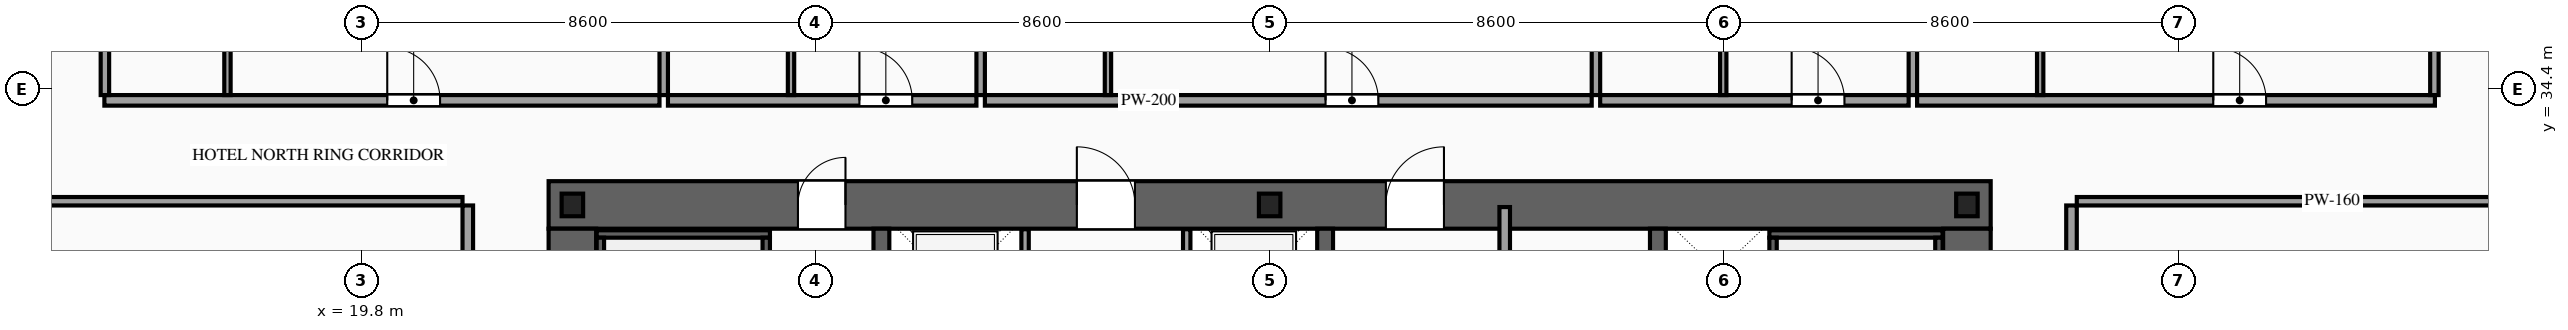
"""IFC4 building model, lengths in metres.
Left out: names, types, materials, properties, quantities, classifications, styles, units other than length and angle.
Written with IfcOpenShell. Run it as: python <this file> out.ifc"""

import sys

from ifc_helpers import new_model, si_unit, direction, frame, frame_2d, origin, origin_2d, place, context, subcontext, project, spatial, rectangle, i_section, extrude, source, transform, mapped, element, fill, save


model = new_model("IFC4")
c1 = context("Model", 3, precision=1e-05, world=origin(), true_north=direction((0.0, 1.0)))
c2 = subcontext(c1, "Body", "Model", "MODEL_VIEW")
j1 = project(units=[si_unit("LENGTHUNIT", "METRE"), si_unit("PLANEANGLEUNIT", "RADIAN")], contexts=[c1])
p1 = place(None, origin())
s1 = spatial("IfcSite", under=j1, at=p1, CompositionType="ELEMENT")
p2 = place(p1, origin())
s2 = spatial("IfcBuilding", under=s1, at=p2, CompositionType="ELEMENT")
p3 = place(p2, frame((0.0, 0.0, 82.0)))
s3 = spatial("IfcBuildingStorey", under=s2, at=p3, CompositionType="ELEMENT", Elevation=82.0)
p4 = place(p3, frame((23.35, 32.2, 0.0), z_axis=(0.0, 0.0, 1.0), x_axis=(1.0, 0.0, 0.0)))
e1 = element("IfcWall", 1, at=p4, inside=s3, PredefinedType="SHEAR", context=c2, shape_type="SweptSolid", body=[
    extrude(rectangle(XDim=27.3, YDim=0.9, at=frame_2d((13.65, 0.0))), origin(), (0.0, 0.0, 1.0), 3.6),
])
p5 = place(p4, frame((4.72, 0.0, 0.0)))
e2 = element("IfcOpeningElement", 2, at=p5, cuts=e1, PredefinedType="OPENING", context=c2, shape_type="SweptSolid", body=[
    extrude(rectangle(XDim=0.9, YDim=2.15, at=frame_2d((0.45, 1.075))), frame((0.0, 0.465, 0.0), z_axis=(0.0, -1.0, 0.0), x_axis=(1.0, 0.0, 0.0)), (0.0, 0.0, 1.0), 0.93),
])
p6 = place(p4, frame((10.0, 0.0, 0.0)))
e3 = element("IfcOpeningElement", 3, at=p6, cuts=e1, PredefinedType="OPENING", context=c2, shape_type="SweptSolid", body=[
    extrude(rectangle(XDim=1.1, YDim=2.2, at=frame_2d((0.55, 1.1))), frame((0.0, 0.465, 0.0), z_axis=(0.0, -1.0, 0.0), x_axis=(1.0, 0.0, 0.0)), (0.0, 0.0, 1.0), 0.93),
])
p7 = place(p4, frame((15.85, 0.0, 0.0)))
e4 = element("IfcOpeningElement", 4, at=p7, cuts=e1, PredefinedType="OPENING", context=c2, shape_type="SweptSolid", body=[
    extrude(rectangle(XDim=1.1, YDim=2.2, at=frame_2d((0.55, 1.1))), frame((0.0, 0.465, 0.0), z_axis=(0.0, -1.0, 0.0), x_axis=(1.0, 0.0, 0.0)), (0.0, 0.0, 1.0), 0.93),
])
m1 = source(origin(), c2, "Body", "SweptSolid", [
    extrude(rectangle(XDim=11.9, YDim=0.9, at=frame_2d((5.95, 0.0))), origin(), (0.0, 0.0, 1.0), 3.6),
])
for number, where, z_axis, x_axis in (
    (5, (23.8, 19.85, 0.0), (0.0, 0.0, 1.0), (0.0, 1.0, 0.0)),
    (6, (50.2, 19.85, 0.0), (0.0, 0.0, 1.0), (0.0, 1.0, 0.0)),
):
    element("IfcWall", number, at=place(p3, frame(where, z_axis=z_axis, x_axis=x_axis)), inside=s3, PredefinedType="SHEAR", context=c2, shape_type="MappedRepresentation", body=[
        mapped(m1, transform((0.0, 0.0, 0.0), scale=1.0)),
    ])
m2 = source(origin(), c2, "Body", "SweptSolid", [
    extrude(rectangle(XDim=11.9, YDim=0.3, at=frame_2d((5.95, 0.0))), origin(), (0.0, 0.0, 1.0), 3.6),
])
for number, where, z_axis, x_axis in (
    (7, (29.65, 19.85, 0.0), (0.0, 0.0, 1.0), (0.0, 1.0, 0.0)),
    (8, (38.05, 19.85, 0.0), (0.0, 0.0, 1.0), (0.0, 1.0, 0.0)),
    (9, (44.35, 19.85, 0.0), (0.0, 0.0, 1.0), (0.0, 1.0, 0.0)),
):
    element("IfcWall", number, at=place(p3, frame(where, z_axis=z_axis, x_axis=x_axis)), inside=s3, PredefinedType="SOLIDWALL", context=c2, shape_type="MappedRepresentation", body=[
        mapped(m2, transform((0.0, 0.0, 0.0), scale=1.0)),
    ])
m3 = source(origin(), c2, "Body", "SweptSolid", [
    extrude(i_section(OverallWidth=0.407, OverallDepth=0.428, WebThickness=0.02, FlangeThickness=0.035, at=origin_2d()), origin(), (0.0, 0.0, 1.0), 3.6),
])
for number, where, z_axis, x_axis in (
    (10, (23.8, 32.2, 0.0), (0.0, 0.0, 1.0), (1.0, 0.0, 0.0)),
    (11, (37.0, 32.2, 0.0), (0.0, 0.0, 1.0), (1.0, 0.0, 0.0)),
    (12, (50.2, 32.2, 0.0), (0.0, 0.0, 1.0), (1.0, 0.0, 0.0)),
):
    element("IfcColumn", number, at=place(p3, frame(where, z_axis=z_axis, x_axis=x_axis)), inside=s3, PredefinedType="COLUMN", context=c2, shape_type="MappedRepresentation", body=[
        mapped(m3, transform((0.0, 0.0, 0.0), scale=1.0)),
    ])
p8 = place(p3, frame((32.37, 29.4, 0.0), z_axis=(0.0, 0.0, 1.0), x_axis=(0.0, 1.0, 0.0)))
e13 = element("IfcWall", 13, at=p8, inside=s3, PredefinedType="SOLIDWALL", context=c2, shape_type="SweptSolid", body=[
    extrude(rectangle(XDim=2.34, YDim=0.14, at=frame_2d((1.17, 0.0))), origin(), (0.0, 0.0, 1.0), 3.32),
])
p9 = place(p8, frame((0.62, 0.0, 0.0)))
e14 = element("IfcOpeningElement", 14, at=p9, cuts=e13, PredefinedType="OPENING", context=c2, shape_type="SweptSolid", body=[
    extrude(rectangle(XDim=1.1, YDim=2.2, at=frame_2d((0.55, 1.1))), frame((0.0, 0.085, 0.0), z_axis=(0.0, -1.0, 0.0), x_axis=(1.0, 0.0, 0.0)), (0.0, 0.0, 1.0), 0.17),
])
p10 = place(p3, frame((35.43, 29.4, 0.0), z_axis=(0.0, 0.0, 1.0), x_axis=(0.0, 1.0, 0.0)))
e15 = element("IfcWall", 15, at=p10, inside=s3, PredefinedType="SOLIDWALL", context=c2, shape_type="SweptSolid", body=[
    extrude(rectangle(XDim=2.34, YDim=0.14, at=frame_2d((1.17, 0.0))), origin(), (0.0, 0.0, 1.0), 3.32),
])
p11 = place(p10, frame((0.62, 0.0, 0.0)))
e16 = element("IfcOpeningElement", 16, at=p11, cuts=e15, PredefinedType="OPENING", context=c2, shape_type="SweptSolid", body=[
    extrude(rectangle(XDim=1.1, YDim=2.2, at=frame_2d((0.55, 1.1))), frame((0.0, 0.085, 0.0), z_axis=(0.0, -1.0, 0.0), x_axis=(1.0, 0.0, 0.0)), (0.0, 0.0, 1.0), 0.17),
])
m4 = source(origin(), c2, "Body", "SweptSolid", [
    extrude(rectangle(XDim=3.28, YDim=0.14, at=frame_2d((1.64, 0.0))), origin(), (0.0, 0.0, 1.0), 3.32),
])
p12 = place(p3, frame((24.26, 31.65, 0.0), z_axis=(0.0, 0.0, 1.0), x_axis=(1.0, 0.0, 0.0)))
e17 = element("IfcWall", 17, at=p12, inside=s3, PredefinedType="SOLIDWALL", context=c2, shape_type="MappedRepresentation", body=[
    mapped(m4, transform((0.0, 0.0, 0.0), scale=1.0)),
])
m5 = source(origin(), c2, "Body", "SweptSolid", [
    extrude(rectangle(XDim=8.94, YDim=0.14, at=frame_2d((4.47, 0.0))), origin(), (0.0, 0.0, 1.0), 3.32),
])
for number, where, z_axis, x_axis in (
    (18, (24.33, 22.64, 0.0), (0.0, 0.0, 1.0), (0.0, 1.0, 0.0)),
    (19, (27.47, 22.64, 0.0), (0.0, 0.0, 1.0), (0.0, 1.0, 0.0)),
):
    element("IfcWall", number, at=place(p3, frame(where, z_axis=z_axis, x_axis=x_axis)), inside=s3, PredefinedType="SOLIDWALL", context=c2, shape_type="MappedRepresentation", body=[
        mapped(m5, transform((0.0, 0.0, 0.0), scale=1.0)),
    ])
p13 = place(p3, frame((46.46, 31.65, 0.0), z_axis=(0.0, 0.0, 1.0), x_axis=(1.0, 0.0, 0.0)))
e20 = element("IfcWall", 20, at=p13, inside=s3, PredefinedType="SOLIDWALL", context=c2, shape_type="MappedRepresentation", body=[
    mapped(m4, transform((0.0, 0.0, 0.0), scale=1.0)),
])
for number, where, z_axis, x_axis in (
    (21, (46.53, 22.64, 0.0), (0.0, 0.0, 1.0), (0.0, 1.0, 0.0)),
    (22, (49.67, 22.64, 0.0), (0.0, 0.0, 1.0), (0.0, 1.0, 0.0)),
):
    element("IfcWall", number, at=place(p3, frame(where, z_axis=z_axis, x_axis=x_axis)), inside=s3, PredefinedType="SOLIDWALL", context=c2, shape_type="MappedRepresentation", body=[
        mapped(m5, transform((0.0, 0.0, 0.0), scale=1.0)),
    ])
m6 = source(origin(), c2, "Body", "SweptSolid", [
    extrude(rectangle(XDim=12.72, YDim=0.2, at=frame_2d((6.36, 0.0))), origin(), (0.0, 0.0, 1.0), 3.32),
])
p14 = place(p3, frame((41.45, 19.44, 0.0), z_axis=(0.0, 0.0, 1.0), x_axis=(0.0, 1.0, 0.0)))
e23 = element("IfcWall", 23, at=p14, inside=s3, PredefinedType="PARTITIONING", context=c2, shape_type="MappedRepresentation", body=[
    mapped(m6, transform((0.0, 0.0, 0.0), scale=1.0)),
])
p15 = place(p3, frame((14.94, 34.18, 0.0), z_axis=(0.0, 0.0, 1.0), x_axis=(1.0, 0.0, 0.0)))
e24 = element("IfcWall", 24, at=p15, inside=s3, PredefinedType="PARTITIONING", context=c2, shape_type="SweptSolid", body=[
    extrude(rectangle(XDim=10.509, YDim=0.2, at=frame_2d((5.254, 0.0))), origin(), (0.0, 0.0, 1.0), 3.32),
])
p16 = place(p15, frame((5.355, 0.0, 0.0)))
e25 = element("IfcOpeningElement", 25, at=p16, cuts=e24, PredefinedType="OPENING", context=c2, shape_type="SweptSolid", body=[
    extrude(rectangle(XDim=1.0, YDim=2.2, at=frame_2d((0.5, 1.1))), frame((0.0, 0.115, 0.0), z_axis=(0.0, -1.0, 0.0), x_axis=(1.0, 0.0, 0.0)), (0.0, 0.0, 1.0), 0.23),
])
m7 = source(origin(), c2, "Body", "SweptSolid", [
    extrude(rectangle(XDim=16.47, YDim=0.16, at=frame_2d((8.235, 0.0))), origin(), (0.0, 0.0, 1.0), 3.32),
])
p17 = place(p3, frame((25.529, 34.28, 0.0), z_axis=(0.0, 0.0, 1.0), x_axis=(0.0, 1.0, 0.0)))
e26 = element("IfcWall", 26, at=p17, inside=s3, PredefinedType="PARTITIONING", context=c2, shape_type="MappedRepresentation", body=[
    mapped(m7, transform((0.0, 0.0, 0.0), scale=1.0)),
])
m8 = source(origin(), c2, "Body", "SweptSolid", [
    extrude(rectangle(XDim=2.42, YDim=0.12, at=frame_2d((1.21, 0.0))), origin(), (0.0, 0.0, 1.0), 3.32),
])
p18 = place(p3, frame((17.27, 34.28, 0.0), z_axis=(0.0, 0.0, 1.0), x_axis=(0.0, 1.0, 0.0)))
e27 = element("IfcWall", 27, at=p18, inside=s3, PredefinedType="PARTITIONING", context=c2, shape_type="MappedRepresentation", body=[
    mapped(m8, transform((0.0, 0.0, 0.0), scale=1.0)),
])
p19 = place(p3, frame((25.609, 34.18, 0.0), z_axis=(0.0, 0.0, 1.0), x_axis=(1.0, 0.0, 0.0)))
e28 = element("IfcWall", 28, at=p19, inside=s3, PredefinedType="PARTITIONING", context=c2, shape_type="SweptSolid", body=[
    extrude(rectangle(XDim=5.84, YDim=0.2, at=frame_2d((2.92, 0.0))), origin(), (0.0, 0.0, 1.0), 3.32),
])
p20 = place(p19, frame((3.625, 0.0, 0.0)))
e29 = element("IfcOpeningElement", 29, at=p20, cuts=e28, PredefinedType="OPENING", context=c2, shape_type="SweptSolid", body=[
    extrude(rectangle(XDim=1.0, YDim=2.2, at=frame_2d((0.5, 1.1))), frame((0.0, 0.115, 0.0), z_axis=(0.0, -1.0, 0.0), x_axis=(1.0, 0.0, 0.0)), (0.0, 0.0, 1.0), 0.23),
])
p21 = place(p3, frame((31.529, 34.28, 0.0), z_axis=(0.0, 0.0, 1.0), x_axis=(0.0, 1.0, 0.0)))
e30 = element("IfcWall", 30, at=p21, inside=s3, PredefinedType="PARTITIONING", context=c2, shape_type="MappedRepresentation", body=[
    mapped(m7, transform((0.0, 0.0, 0.0), scale=1.0)),
])
p22 = place(p3, frame((27.939, 34.28, 0.0), z_axis=(0.0, 0.0, 1.0), x_axis=(0.0, 1.0, 0.0)))
e31 = element("IfcWall", 31, at=p22, inside=s3, PredefinedType="PARTITIONING", context=c2, shape_type="MappedRepresentation", body=[
    mapped(m8, transform((0.0, 0.0, 0.0), scale=1.0)),
])
p23 = place(p3, frame((31.609, 34.18, 0.0), z_axis=(0.0, 0.0, 1.0), x_axis=(1.0, 0.0, 0.0)))
e32 = element("IfcWall", 32, at=p23, inside=s3, PredefinedType="PARTITIONING", context=c2, shape_type="SweptSolid", body=[
    extrude(rectangle(XDim=11.488, YDim=0.2, at=frame_2d((5.744, 0.0))), origin(), (0.0, 0.0, 1.0), 3.32),
])
p24 = place(p23, frame((6.449, 0.0, 0.0)))
e33 = element("IfcOpeningElement", 33, at=p24, cuts=e32, PredefinedType="OPENING", context=c2, shape_type="SweptSolid", body=[
    extrude(rectangle(XDim=1.0, YDim=2.2, at=frame_2d((0.5, 1.1))), frame((0.0, 0.115, 0.0), z_axis=(0.0, -1.0, 0.0), x_axis=(1.0, 0.0, 0.0)), (0.0, 0.0, 1.0), 0.23),
])
p25 = place(p3, frame((43.177, 34.28, 0.0), z_axis=(0.0, 0.0, 1.0), x_axis=(0.0, 1.0, 0.0)))
e34 = element("IfcWall", 34, at=p25, inside=s3, PredefinedType="PARTITIONING", context=c2, shape_type="MappedRepresentation", body=[
    mapped(m7, transform((0.0, 0.0, 0.0), scale=1.0)),
])
p26 = place(p3, frame((33.939, 34.28, 0.0), z_axis=(0.0, 0.0, 1.0), x_axis=(0.0, 1.0, 0.0)))
e35 = element("IfcWall", 35, at=p26, inside=s3, PredefinedType="PARTITIONING", context=c2, shape_type="MappedRepresentation", body=[
    mapped(m8, transform((0.0, 0.0, 0.0), scale=1.0)),
])
p27 = place(p3, frame((43.257, 34.18, 0.0), z_axis=(0.0, 0.0, 1.0), x_axis=(1.0, 0.0, 0.0)))
e36 = element("IfcWall", 36, at=p27, inside=s3, PredefinedType="PARTITIONING", context=c2, shape_type="SweptSolid", body=[
    extrude(rectangle(XDim=5.84, YDim=0.2, at=frame_2d((2.92, 0.0))), origin(), (0.0, 0.0, 1.0), 3.32),
])
p28 = place(p27, frame((3.625, 0.0, 0.0)))
e37 = element("IfcOpeningElement", 37, at=p28, cuts=e36, PredefinedType="OPENING", context=c2, shape_type="SweptSolid", body=[
    extrude(rectangle(XDim=1.0, YDim=2.2, at=frame_2d((0.5, 1.1))), frame((0.0, 0.115, 0.0), z_axis=(0.0, -1.0, 0.0), x_axis=(1.0, 0.0, 0.0)), (0.0, 0.0, 1.0), 0.23),
])
p29 = place(p3, frame((49.177, 34.28, 0.0), z_axis=(0.0, 0.0, 1.0), x_axis=(0.0, 1.0, 0.0)))
e38 = element("IfcWall", 38, at=p29, inside=s3, PredefinedType="PARTITIONING", context=c2, shape_type="MappedRepresentation", body=[
    mapped(m7, transform((0.0, 0.0, 0.0), scale=1.0)),
])
p30 = place(p3, frame((45.587, 34.28, 0.0), z_axis=(0.0, 0.0, 1.0), x_axis=(0.0, 1.0, 0.0)))
e39 = element("IfcWall", 39, at=p30, inside=s3, PredefinedType="PARTITIONING", context=c2, shape_type="MappedRepresentation", body=[
    mapped(m8, transform((0.0, 0.0, 0.0), scale=1.0)),
])
p31 = place(p3, frame((49.257, 34.18, 0.0), z_axis=(0.0, 0.0, 1.0), x_axis=(1.0, 0.0, 0.0)))
e40 = element("IfcWall", 40, at=p31, inside=s3, PredefinedType="PARTITIONING", context=c2, shape_type="SweptSolid", body=[
    extrude(rectangle(XDim=9.803, YDim=0.2, at=frame_2d((4.901, 0.0))), origin(), (0.0, 0.0, 1.0), 3.32),
])
p32 = place(p31, frame((5.607, 0.0, 0.0)))
e41 = element("IfcOpeningElement", 41, at=p32, cuts=e40, PredefinedType="OPENING", context=c2, shape_type="SweptSolid", body=[
    extrude(rectangle(XDim=1.0, YDim=2.2, at=frame_2d((0.5, 1.1))), frame((0.0, 0.115, 0.0), z_axis=(0.0, -1.0, 0.0), x_axis=(1.0, 0.0, 0.0)), (0.0, 0.0, 1.0), 0.23),
])
m9 = source(origin(), c2, "Body", "SweptSolid", [
    extrude(rectangle(XDim=16.32, YDim=0.16, at=frame_2d((8.16, 0.0))), origin(), (0.0, 0.0, 1.0), 3.32),
])
for number, where, z_axis, x_axis in (
    (42, (14.95, 34.28, 0.0), (0.0, 0.0, 1.0), (0.0, 1.0, 0.0)),
    (43, (59.05, 34.28, 0.0), (0.0, 0.0, 1.0), (0.0, 1.0, 0.0)),
):
    element("IfcWall", number, at=place(p3, frame(where, z_axis=z_axis, x_axis=x_axis)), inside=s3, PredefinedType="PARTITIONING", context=c2, shape_type="MappedRepresentation", body=[
        mapped(m9, transform((0.0, 0.0, 0.0), scale=1.0)),
    ])
p33 = place(p3, frame((51.587, 34.28, 0.0), z_axis=(0.0, 0.0, 1.0), x_axis=(0.0, 1.0, 0.0)))
e44 = element("IfcWall", 44, at=p33, inside=s3, PredefinedType="PARTITIONING", context=c2, shape_type="MappedRepresentation", body=[
    mapped(m8, transform((0.0, 0.0, 0.0), scale=1.0)),
])
p34 = place(p3, frame((21.82, 25.88, 0.0), z_axis=(0.0, 0.0, 1.0), x_axis=(0.0, 1.0, 0.0)))
e45 = element("IfcWall", 45, at=p34, inside=s3, PredefinedType="PARTITIONING", context=c2, shape_type="SweptSolid", body=[
    extrude(rectangle(XDim=6.31, YDim=0.2, at=frame_2d((3.155, 0.0))), origin(), (0.0, 0.0, 1.0), 3.32),
])
p35 = place(p34, frame((3.835, 0.0, 0.0)))
e46 = element("IfcOpeningElement", 46, at=p35, cuts=e45, PredefinedType="OPENING", context=c2, shape_type="SweptSolid", body=[
    extrude(rectangle(XDim=1.0, YDim=2.2, at=frame_2d((0.5, 1.1))), frame((0.0, 0.115, 0.0), z_axis=(0.0, -1.0, 0.0), x_axis=(1.0, 0.0, 0.0)), (0.0, 0.0, 1.0), 0.23),
])
m10 = source(origin(), c2, "Body", "SweptSolid", [
    extrude(rectangle(XDim=9.67, YDim=0.16, at=frame_2d((4.835, 0.0))), origin(), (0.0, 0.0, 1.0), 3.32),
])
p36 = place(p3, frame((12.05, 32.27, 0.0), z_axis=(0.0, 0.0, 1.0), x_axis=(1.0, 0.0, 0.0)))
e47 = element("IfcWall", 47, at=p36, inside=s3, PredefinedType="PARTITIONING", context=c2, shape_type="MappedRepresentation", body=[
    mapped(m10, transform((0.0, 0.0, 0.0), scale=1.0)),
])
p37 = place(p3, frame((52.18, 25.88, 0.0), z_axis=(0.0, 0.0, 1.0), x_axis=(0.0, 1.0, 0.0)))
e48 = element("IfcWall", 48, at=p37, inside=s3, PredefinedType="PARTITIONING", context=c2, shape_type="SweptSolid", body=[
    extrude(rectangle(XDim=6.31, YDim=0.2, at=frame_2d((3.155, 0.0))), origin(), (0.0, 0.0, 1.0), 3.32),
])
p38 = place(p37, frame((3.835, 0.0, 0.0)))
e49 = element("IfcOpeningElement", 49, at=p38, cuts=e48, PredefinedType="OPENING", context=c2, shape_type="SweptSolid", body=[
    extrude(rectangle(XDim=1.0, YDim=2.2, at=frame_2d((0.5, 1.1))), frame((0.0, 0.115, 0.0), z_axis=(0.0, -1.0, 0.0), x_axis=(1.0, 0.0, 0.0)), (0.0, 0.0, 1.0), 0.23),
])
p39 = place(p3, frame((52.28, 32.27, 0.0), z_axis=(0.0, 0.0, 1.0), x_axis=(1.0, 0.0, 0.0)))
e50 = element("IfcWall", 50, at=p39, inside=s3, PredefinedType="PARTITIONING", context=c2, shape_type="MappedRepresentation", body=[
    mapped(m10, transform((0.0, 0.0, 0.0), scale=1.0)),
])
m11 = source(origin(), c2, "Body", "SweptSolid", [
    extrude(rectangle(XDim=0.9, YDim=2.15, at=frame_2d((0.45, 1.075))), frame((0.0, 0.025, 0.0), z_axis=(0.0, -1.0, 0.0), x_axis=(1.0, 0.0, 0.0)), (0.0, 0.0, 1.0), 0.05),
])
p40 = place(p5, origin())
e51 = element("IfcDoor", 51, at=p40, inside=s3, OperationType="SINGLE_SWING_RIGHT", PredefinedType="DOOR", context=c2, shape_type="MappedRepresentation", body=[
    mapped(m11, transform((0.0, 0.0, 0.0), scale=1.0)),
])
fill(e2, e51)
m12 = source(origin(), c2, "Body", "SweptSolid", [
    extrude(rectangle(XDim=1.1, YDim=2.2, at=frame_2d((0.55, 1.1))), frame((0.0, 0.025, 0.0), z_axis=(0.0, -1.0, 0.0), x_axis=(1.0, 0.0, 0.0)), (0.0, 0.0, 1.0), 0.05),
])
p41 = place(p6, origin())
e52 = element("IfcDoor", 52, at=p41, inside=s3, OperationType="SINGLE_SWING_LEFT", PredefinedType="DOOR", context=c2, shape_type="MappedRepresentation", body=[
    mapped(m12, transform((0.0, 0.0, 0.0), scale=1.0)),
])
fill(e3, e52)
p42 = place(p7, origin())
e53 = element("IfcDoor", 53, at=p42, inside=s3, OperationType="SINGLE_SWING_RIGHT", PredefinedType="DOOR", context=c2, shape_type="MappedRepresentation", body=[
    mapped(m12, transform((0.0, 0.0, 0.0), scale=1.0)),
])
fill(e4, e53)
m13 = source(origin(), c2, "Body", "SweptSolid", [
    extrude(rectangle(XDim=1.0, YDim=2.2, at=frame_2d((0.5, 1.1))), frame((0.0, 0.025, 0.0), z_axis=(0.0, -1.0, 0.0), x_axis=(1.0, 0.0, 0.0)), (0.0, 0.0, 1.0), 0.05),
])
p43 = place(p16, origin())
e54 = element("IfcDoor", 54, at=p43, inside=s3, OperationType="SINGLE_SWING_LEFT", PredefinedType="DOOR", context=c2, shape_type="MappedRepresentation", body=[
    mapped(m13, transform((0.0, 0.0, 0.0), scale=1.0)),
])
fill(e25, e54)
p44 = place(p20, origin())
e55 = element("IfcDoor", 55, at=p44, inside=s3, OperationType="SINGLE_SWING_LEFT", PredefinedType="DOOR", context=c2, shape_type="MappedRepresentation", body=[
    mapped(m13, transform((0.0, 0.0, 0.0), scale=1.0)),
])
fill(e29, e55)
p45 = place(p24, origin())
e56 = element("IfcDoor", 56, at=p45, inside=s3, OperationType="SINGLE_SWING_LEFT", PredefinedType="DOOR", context=c2, shape_type="MappedRepresentation", body=[
    mapped(m13, transform((0.0, 0.0, 0.0), scale=1.0)),
])
fill(e33, e56)
p46 = place(p28, origin())
e57 = element("IfcDoor", 57, at=p46, inside=s3, OperationType="SINGLE_SWING_LEFT", PredefinedType="DOOR", context=c2, shape_type="MappedRepresentation", body=[
    mapped(m13, transform((0.0, 0.0, 0.0), scale=1.0)),
])
fill(e37, e57)
p47 = place(p32, origin())
e58 = element("IfcDoor", 58, at=p47, inside=s3, OperationType="SINGLE_SWING_LEFT", PredefinedType="DOOR", context=c2, shape_type="MappedRepresentation", body=[
    mapped(m13, transform((0.0, 0.0, 0.0), scale=1.0)),
])
fill(e41, e58)
save(model, sys.argv[1])
